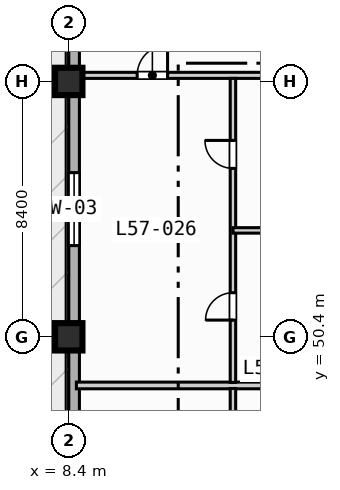
"""IFC4 building model, lengths in metres.
Left out: names, types, materials, properties, quantities, classifications, styles, units other than length and angle.
Written with IfcOpenShell. Run it as: python <this file> out.ifc"""

import sys

from ifc_helpers import new_model, si_unit, direction, frame, frame_2d, origin, origin_2d, place, context, subcontext, project, spatial, rectangle, extrude, element, fill, save


model = new_model("IFC4")
c1 = context("Model", 3, precision=1e-05, world=origin(), true_north=direction((0.0, 1.0)))
c2 = subcontext(c1, "Body", "Model", "MODEL_VIEW")
j1 = project(units=[si_unit("LENGTHUNIT", "METRE"), si_unit("PLANEANGLEUNIT", "RADIAN")], contexts=[c1])
p1 = place(None, origin())
s1 = spatial("IfcSite", under=j1, at=p1, CompositionType="ELEMENT")
p2 = place(p1, origin())
s2 = spatial("IfcBuilding", under=s1, at=p2, CompositionType="ELEMENT")
p3 = place(p2, frame((0.0, 0.0, 234.2)))
s3 = spatial("IfcBuildingStorey", under=s2, at=p3, CompositionType="ELEMENT", Elevation=234.2)
for number, where, z_axis, x_axis in (
    (1, (8.4, 50.4, 0.0), (0.0, 0.0, 1.0), (1.0, 0.0, 0.0)),
    (2, (8.4, 58.8, 0.0), (0.0, 0.0, 1.0), (1.0, 0.0, 0.0)),
):
    element("IfcColumn", number, at=place(p3, frame(where, z_axis=z_axis, x_axis=x_axis)), inside=s3, PredefinedType="COLUMN", context=c2, shape_type="SweptSolid", body=[
        extrude(rectangle(XDim=0.9, YDim=0.9, at=origin_2d()), origin(), (0.0, 0.0, 1.0), 3.7),
    ])
p4 = place(p3, frame((8.575, 11.575, 0.0), z_axis=(0.0, 0.0, 1.0), x_axis=(0.0, 1.0, 0.0)))
e3 = element("IfcWall", 3, at=p4, inside=s3, PredefinedType="STANDARD", context=c2, shape_type="SweptSolid", body=[
    extrude(rectangle(XDim=60.85, YDim=0.35, at=frame_2d((30.425, 0.0))), origin(), (0.0, 0.0, 1.0), 3.47),
])
p5 = place(p4, frame((25.525, 0.0, 0.0)))
e4 = element("IfcOpeningElement", 4, at=p5, cuts=e3, PredefinedType="OPENING", context=c2, shape_type="SweptSolid", body=[
    extrude(rectangle(XDim=1.4, YDim=2.2, at=frame_2d((0.7, 1.1))), frame((0.0, 0.185, 0.0), z_axis=(0.0, -1.0, 0.0), x_axis=(1.0, 0.0, 0.0)), (0.0, 0.0, 1.0), 0.37),
])
p6 = place(p4, frame((33.725, 0.0, 0.85)))
e5 = element("IfcOpeningElement", 5, at=p6, cuts=e3, PredefinedType="OPENING", context=c2, shape_type="SweptSolid", body=[
    extrude(rectangle(XDim=1.8, YDim=1.8, at=frame_2d((0.9, 0.9))), frame((0.0, 0.185, 0.0), z_axis=(0.0, -1.0, 0.0), x_axis=(1.0, 0.0, 0.0)), (0.0, 0.0, 1.0), 0.37),
])
p7 = place(p4, frame((41.825, 0.0, 0.85)))
e6 = element("IfcOpeningElement", 6, at=p7, cuts=e3, PredefinedType="OPENING", context=c2, shape_type="SweptSolid", body=[
    extrude(rectangle(XDim=2.4, YDim=1.95, at=frame_2d((1.2, 0.975))), frame((0.0, 0.185, 0.0), z_axis=(0.0, -1.0, 0.0), x_axis=(1.0, 0.0, 0.0)), (0.0, 0.0, 1.0), 0.37),
])
p8 = place(p3, frame((8.65, 59.0, 0.0), z_axis=(0.0, 0.0, 1.0), x_axis=(1.0, 0.0, 0.0)))
e7 = element("IfcWall", 7, at=p8, inside=s3, PredefinedType="PARTITIONING", context=c2, shape_type="SweptSolid", body=[
    extrude(rectangle(XDim=7.95, YDim=0.2, at=frame_2d((3.975, 0.0))), origin(), (0.0, 0.0, 1.0), 3.116),
])
p9 = place(p8, frame((2.0, 0.0, 0.0)))
e8 = element("IfcOpeningElement", 8, at=p9, cuts=e7, PredefinedType="OPENING", context=c2, shape_type="SweptSolid", body=[
    extrude(rectangle(XDim=1.0, YDim=2.15, at=frame_2d((0.5, 1.075))), frame((0.0, 0.11, 0.0), z_axis=(0.0, -1.0, 0.0), x_axis=(1.0, 0.0, 0.0)), (0.0, 0.0, 1.0), 0.22),
])
p10 = place(p3, frame((8.65, 48.8, 0.0), z_axis=(0.0, 0.0, 1.0), x_axis=(1.0, 0.0, 0.0)))
e9 = element("IfcWall", 9, at=p10, inside=s3, PredefinedType="PARTITIONING", context=c2, shape_type="SweptSolid", body=[
    extrude(rectangle(XDim=7.95, YDim=0.22, at=frame_2d((3.975, 0.0))), origin(), (0.0, 0.0, 1.0), 3.47),
])
p11 = place(p3, frame((13.8, 41.7, 0.0), z_axis=(0.0, 0.0, 1.0), x_axis=(0.0, 1.0, 0.0)))
e10 = element("IfcWall", 10, at=p11, inside=s3, PredefinedType="PLUMBINGWALL", context=c2, shape_type="SweptSolid", body=[
    extrude(rectangle(XDim=7.0, YDim=0.18, at=frame_2d((3.5, 0.0))), origin(), (0.0, 0.0, 1.0), 3.47),
])
p12 = place(p11, frame((1.3, 0.0, 0.0)))
e11 = element("IfcOpeningElement", 11, at=p12, cuts=e10, PredefinedType="OPENING", context=c2, shape_type="SweptSolid", body=[
    extrude(rectangle(XDim=0.9, YDim=2.1, at=frame_2d((0.45, 1.05))), frame((0.0, 0.1, 0.0), z_axis=(0.0, -1.0, 0.0), x_axis=(1.0, 0.0, 0.0)), (0.0, 0.0, 1.0), 0.2),
])
p13 = place(p11, frame((4.79, 0.0, 0.0)))
e12 = element("IfcOpeningElement", 12, at=p13, cuts=e10, PredefinedType="OPENING", context=c2, shape_type="SweptSolid", body=[
    extrude(rectangle(XDim=0.92, YDim=2.1, at=frame_2d((0.46, 1.05))), frame((0.0, 0.1, 0.0), z_axis=(0.0, -1.0, 0.0), x_axis=(1.0, 0.0, 0.0)), (0.0, 0.0, 1.0), 0.2),
])
p14 = place(p3, frame((13.8, 48.9, 0.0), z_axis=(0.0, 0.0, 1.0), x_axis=(0.0, 1.0, 0.0)))
e13 = element("IfcWall", 13, at=p14, inside=s3, PredefinedType="PLUMBINGWALL", context=c2, shape_type="SweptSolid", body=[
    extrude(rectangle(XDim=10.0, YDim=0.18, at=frame_2d((5.0, 0.0))), origin(), (0.0, 0.0, 1.0), 3.47),
])
p15 = place(p14, frame((2.05, 0.0, 0.0)))
e14 = element("IfcOpeningElement", 14, at=p15, cuts=e13, PredefinedType="OPENING", context=c2, shape_type="SweptSolid", body=[
    extrude(rectangle(XDim=0.9, YDim=2.1, at=frame_2d((0.45, 1.05))), frame((0.0, 0.1, 0.0), z_axis=(0.0, -1.0, 0.0), x_axis=(1.0, 0.0, 0.0)), (0.0, 0.0, 1.0), 0.2),
])
p16 = place(p14, frame((7.04, 0.0, 0.0)))
e15 = element("IfcOpeningElement", 15, at=p16, cuts=e13, PredefinedType="OPENING", context=c2, shape_type="SweptSolid", body=[
    extrude(rectangle(XDim=0.92, YDim=2.1, at=frame_2d((0.46, 1.05))), frame((0.0, 0.1, 0.0), z_axis=(0.0, -1.0, 0.0), x_axis=(1.0, 0.0, 0.0)), (0.0, 0.0, 1.0), 0.2),
])
p17 = place(p3, frame((13.8, 53.9, 0.0), z_axis=(0.0, 0.0, 1.0), x_axis=(1.0, 0.0, 0.0)))
e16 = element("IfcWall", 16, at=p17, inside=s3, PredefinedType="PLUMBINGWALL", context=c2, shape_type="SweptSolid", body=[
    extrude(rectangle(XDim=2.8, YDim=0.18, at=frame_2d((1.4, 0.0))), origin(), (0.0, 0.0, 1.0), 3.47),
])
p18 = place(p7, origin())
e17 = element("IfcWindow", 17, at=p18, inside=s3, PartitioningType="SINGLE_PANEL", PredefinedType="WINDOW", context=c2, shape_type="SweptSolid", body=[
    extrude(rectangle(XDim=2.4, YDim=1.95, at=frame_2d((1.2, 0.975))), frame((0.0, 0.03, 0.0), z_axis=(0.0, -1.0, 0.0), x_axis=(1.0, 0.0, 0.0)), (0.0, 0.0, 1.0), 0.06),
])
fill(e6, e17)
p19 = place(p9, origin())
e18 = element("IfcDoor", 18, at=p19, inside=s3, OperationType="SINGLE_SWING_RIGHT", PredefinedType="DOOR", context=c2, shape_type="SweptSolid", body=[
    extrude(rectangle(XDim=1.0, YDim=2.15, at=frame_2d((0.5, 1.075))), frame((0.0, 0.025, 0.0), z_axis=(0.0, -1.0, 0.0), x_axis=(1.0, 0.0, 0.0)), (0.0, 0.0, 1.0), 0.05),
])
fill(e8, e18)
p20 = place(p15, origin())
e19 = element("IfcDoor", 19, at=p20, inside=s3, OperationType="SINGLE_SWING_LEFT", PredefinedType="DOOR", context=c2, shape_type="SweptSolid", body=[
    extrude(rectangle(XDim=0.9, YDim=2.1, at=frame_2d((0.45, 1.05))), frame((0.0, 0.025, 0.0), z_axis=(0.0, -1.0, 0.0), x_axis=(1.0, 0.0, 0.0)), (0.0, 0.0, 1.0), 0.05),
])
fill(e14, e19)
p21 = place(p16, origin())
e20 = element("IfcDoor", 20, at=p21, inside=s3, OperationType="SINGLE_SWING_RIGHT", PredefinedType="DOOR", context=c2, shape_type="SweptSolid", body=[
    extrude(rectangle(XDim=0.92, YDim=2.1, at=frame_2d((0.46, 1.05))), frame((0.0, 0.025, 0.0), z_axis=(0.0, -1.0, 0.0), x_axis=(1.0, 0.0, 0.0)), (0.0, 0.0, 1.0), 0.05),
])
fill(e15, e20)
save(model, sys.argv[1])
